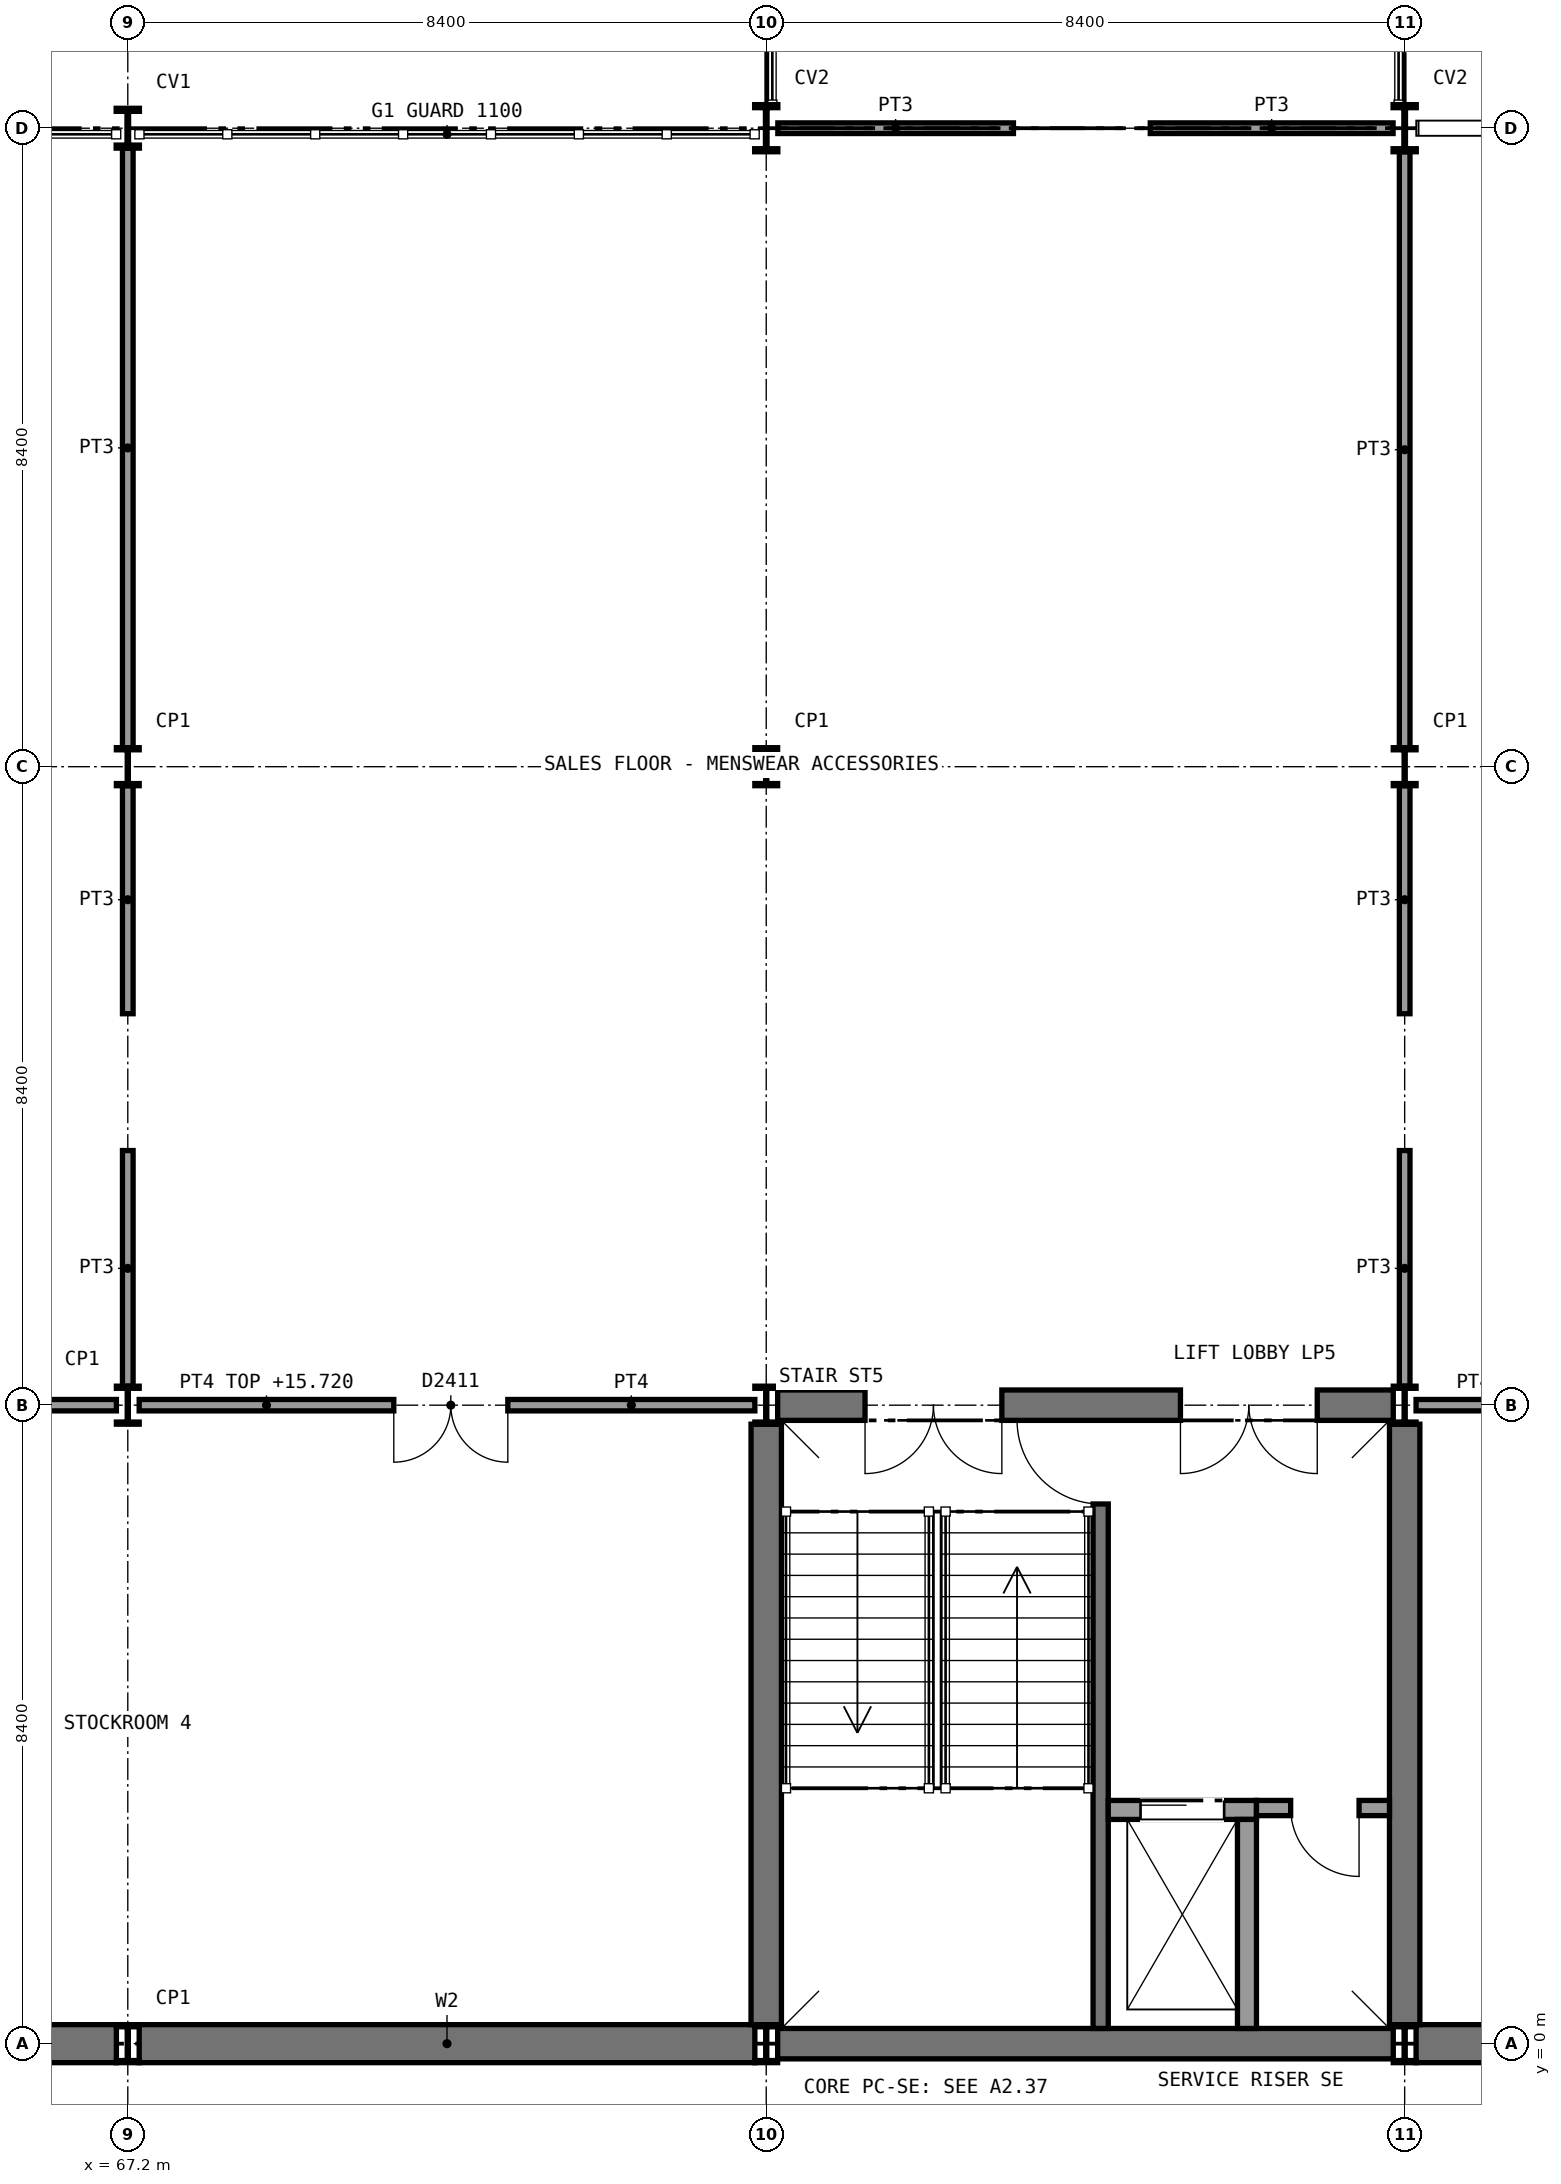
"""IFC4 building model, lengths in metres.
Left out: names, types, materials, properties, quantities, classifications, styles, units other than length and angle.
Written with IfcOpenShell. Run it as: python <this file> out.ifc"""

import sys

from ifc_helpers import new_model, si_unit, direction, frame, frame_2d, origin, origin_2d, place, context, subcontext, project, spatial, rectangle, i_section, extrude, element, fill, save


model = new_model("IFC4")
c1 = context("Model", 3, precision=1e-05, world=origin(), true_north=direction((0.0, 1.0)))
c2 = subcontext(c1, "Body", "Model", "MODEL_VIEW")
j1 = project(units=[si_unit("LENGTHUNIT", "METRE"), si_unit("PLANEANGLEUNIT", "RADIAN")], contexts=[c1])
p1 = place(None, origin())
s1 = spatial("IfcSite", under=j1, at=p1, CompositionType="ELEMENT")
p2 = place(p1, origin())
s2 = spatial("IfcBuilding", under=s1, at=p2, CompositionType="ELEMENT")
p3 = place(p2, frame((0.0, 0.0, 11.4)))
s3 = spatial("IfcBuildingStorey", under=s2, at=p3, CompositionType="ELEMENT", Elevation=11.4)
p4 = place(p3, frame((58.95, 0.0, 0.0), z_axis=(0.0, 0.0, 1.0), x_axis=(1.0, 0.0, 0.0)))
e1 = element("IfcWall", 1, at=p4, inside=s3, PredefinedType="SHEAR", context=c2, shape_type="SweptSolid", body=[
    extrude(rectangle(XDim=8.1, YDim=0.5, at=frame_2d((4.05, 0.0))), origin(), (0.0, 0.0, 1.0), 4.65),
])
p5 = place(p3, frame((67.35, 0.0, 0.0), z_axis=(0.0, 0.0, 1.0), x_axis=(1.0, 0.0, 0.0)))
e2 = element("IfcWall", 2, at=p5, inside=s3, PredefinedType="SHEAR", context=c2, shape_type="SweptSolid", body=[
    extrude(rectangle(XDim=8.1, YDim=0.5, at=frame_2d((4.05, 0.0))), origin(), (0.0, 0.0, 1.0), 4.65),
])
p6 = place(p3, frame((84.15, 0.0, 0.0), z_axis=(0.0, 0.0, 1.0), x_axis=(1.0, 0.0, 0.0)))
e3 = element("IfcWall", 3, at=p6, inside=s3, PredefinedType="SHEAR", context=c2, shape_type="SweptSolid", body=[
    extrude(rectangle(XDim=8.1, YDim=0.5, at=frame_2d((4.05, 0.0))), origin(), (0.0, 0.0, 1.0), 4.65),
])
p7 = place(p3, frame((75.75, 0.0, 0.0), z_axis=(0.0, 0.0, 1.0), x_axis=(1.0, 0.0, 0.0)))
e4 = element("IfcWall", 4, at=p7, inside=s3, PredefinedType="SHEAR", context=c2, shape_type="SweptSolid", body=[
    extrude(rectangle(XDim=8.1, YDim=0.4, at=frame_2d((4.05, 0.0))), origin(), (0.0, 0.0, 1.0), 4.65),
])
p8 = place(p3, frame((75.75, 8.4, 0.0), z_axis=(0.0, 0.0, 1.0), x_axis=(1.0, 0.0, 0.0)))
e5 = element("IfcWall", 5, at=p8, inside=s3, PredefinedType="SHEAR", context=c2, shape_type="SweptSolid", body=[
    extrude(rectangle(XDim=8.1, YDim=0.4, at=frame_2d((4.05, 0.0))), origin(), (0.0, 0.0, 1.0), 4.65),
])
p9 = place(p8, frame((1.15, 0.0, 0.0)))
e6 = element("IfcOpeningElement", 6, at=p9, cuts=e5, PredefinedType="OPENING", context=c2, shape_type="SweptSolid", body=[
    extrude(rectangle(XDim=1.8, YDim=2.1, at=frame_2d((0.9, 1.05))), frame((0.0, 0.21, 0.0), z_axis=(0.0, -1.0, 0.0), x_axis=(1.0, 0.0, 0.0)), (0.0, 0.0, 1.0), 0.42),
])
p10 = place(p8, frame((5.3, 0.0, 0.0)))
e7 = element("IfcOpeningElement", 7, at=p10, cuts=e5, PredefinedType="OPENING", context=c2, shape_type="SweptSolid", body=[
    extrude(rectangle(XDim=1.8, YDim=2.1, at=frame_2d((0.9, 1.05))), frame((0.0, 0.21, 0.0), z_axis=(0.0, -1.0, 0.0), x_axis=(1.0, 0.0, 0.0)), (0.0, 0.0, 1.0), 0.42),
])
for number, where, z_axis, x_axis in (
    (8, (75.6, 0.25, 0.0), (0.0, 0.0, 1.0), (0.0, 1.0, 0.0)),
    (9, (84.0, 0.25, 0.0), (0.0, 0.0, 1.0), (0.0, 1.0, 0.0)),
):
    element("IfcWall", number, at=place(p3, frame(where, z_axis=z_axis, x_axis=x_axis)), inside=s3, PredefinedType="SHEAR", context=c2, shape_type="SweptSolid", body=[
        extrude(rectangle(XDim=7.9, YDim=0.4, at=frame_2d((3.95, 0.0))), origin(), (0.0, 0.0, 1.0), 4.65),
    ])
for number, where, z_axis, x_axis in (
    (10, (67.2, 0.0, 0.0), (0.0, 0.0, 1.0), (1.0, 0.0, 0.0)),
    (11, (67.2, 8.4, 0.0), (0.0, 0.0, 1.0), (1.0, 0.0, 0.0)),
    (12, (67.2, 16.8, 0.0), (0.0, 0.0, 1.0), (1.0, 0.0, 0.0)),
):
    element("IfcColumn", number, at=place(p3, frame(where, z_axis=z_axis, x_axis=x_axis)), inside=s3, PredefinedType="COLUMN", context=c2, shape_type="SweptSolid", body=[
        extrude(i_section(OverallWidth=0.3, OverallDepth=0.5, WebThickness=0.014, FlangeThickness=0.028, FilletRadius=0.027, at=origin_2d()), origin(), (0.0, 0.0, 1.0), 4.8),
    ])
p11 = place(p3, frame((67.2, 25.2, 0.0), z_axis=(0.0, 0.0, 1.0), x_axis=(1.0, 0.0, 0.0)))
e13 = element("IfcColumn", 13, at=p11, inside=s3, PredefinedType="COLUMN", context=c2, shape_type="SweptSolid", body=[
    extrude(i_section(OverallWidth=0.306, OverallDepth=0.524, WebThickness=0.021, FlangeThickness=0.04, FilletRadius=0.027, at=origin_2d()), origin(), (0.0, 0.0, 1.0), 4.8),
])
for number, where, z_axis, x_axis in (
    (14, (75.6, 0.0, 0.0), (0.0, 0.0, 1.0), (1.0, 0.0, 0.0)),
    (15, (75.6, 8.4, 0.0), (0.0, 0.0, 1.0), (1.0, 0.0, 0.0)),
    (16, (75.6, 16.8, 0.0), (0.0, 0.0, 1.0), (1.0, 0.0, 0.0)),
):
    element("IfcColumn", number, at=place(p3, frame(where, z_axis=z_axis, x_axis=x_axis)), inside=s3, PredefinedType="COLUMN", context=c2, shape_type="SweptSolid", body=[
        extrude(i_section(OverallWidth=0.3, OverallDepth=0.5, WebThickness=0.014, FlangeThickness=0.028, FilletRadius=0.027, at=origin_2d()), origin(), (0.0, 0.0, 1.0), 4.8),
    ])
p12 = place(p3, frame((75.6, 25.2, 0.0), z_axis=(0.0, 0.0, 1.0), x_axis=(1.0, 0.0, 0.0)))
e17 = element("IfcColumn", 17, at=p12, inside=s3, PredefinedType="COLUMN", context=c2, shape_type="SweptSolid", body=[
    extrude(i_section(OverallWidth=0.305, OverallDepth=0.62, WebThickness=0.021, FlangeThickness=0.04, FilletRadius=0.027, at=origin_2d()), origin(), (0.0, 0.0, 1.0), 4.8),
])
for number, where, z_axis, x_axis in (
    (18, (84.0, 0.0, 0.0), (0.0, 0.0, 1.0), (1.0, 0.0, 0.0)),
    (19, (84.0, 8.4, 0.0), (0.0, 0.0, 1.0), (1.0, 0.0, 0.0)),
    (20, (84.0, 16.8, 0.0), (0.0, 0.0, 1.0), (1.0, 0.0, 0.0)),
):
    element("IfcColumn", number, at=place(p3, frame(where, z_axis=z_axis, x_axis=x_axis)), inside=s3, PredefinedType="COLUMN", context=c2, shape_type="SweptSolid", body=[
        extrude(i_section(OverallWidth=0.3, OverallDepth=0.5, WebThickness=0.014, FlangeThickness=0.028, FilletRadius=0.027, at=origin_2d()), origin(), (0.0, 0.0, 1.0), 4.8),
    ])
p13 = place(p3, frame((84.0, 25.2, 0.0), z_axis=(0.0, 0.0, 1.0), x_axis=(1.0, 0.0, 0.0)))
e21 = element("IfcColumn", 21, at=p13, inside=s3, PredefinedType="COLUMN", context=c2, shape_type="SweptSolid", body=[
    extrude(i_section(OverallWidth=0.305, OverallDepth=0.62, WebThickness=0.021, FlangeThickness=0.04, FilletRadius=0.027, at=origin_2d()), origin(), (0.0, 0.0, 1.0), 4.8),
])
p14 = place(p3, frame((58.95, 8.4, 0.0), z_axis=(0.0, 0.0, 1.0), x_axis=(1.0, 0.0, 0.0)))
e22 = element("IfcWall", 22, at=p14, inside=s3, PredefinedType="SOLIDWALL", context=c2, shape_type="SweptSolid", body=[
    extrude(rectangle(XDim=8.1, YDim=0.15, at=frame_2d((4.05, 0.0))), origin(), (0.0, 0.0, 1.0), 4.32),
])
p15 = place(p14, frame((3.35, 0.0, 0.0)))
e23 = element("IfcOpeningElement", 23, at=p15, cuts=e22, PredefinedType="OPENING", context=c2, shape_type="SweptSolid", body=[
    extrude(rectangle(XDim=1.5, YDim=2.1, at=frame_2d((0.75, 1.05))), frame((0.0, 0.085, 0.0), z_axis=(0.0, -1.0, 0.0), x_axis=(1.0, 0.0, 0.0)), (0.0, 0.0, 1.0), 0.17),
])
p16 = place(p3, frame((67.35, 8.4, 0.0), z_axis=(0.0, 0.0, 1.0), x_axis=(1.0, 0.0, 0.0)))
e24 = element("IfcWall", 24, at=p16, inside=s3, PredefinedType="SOLIDWALL", context=c2, shape_type="SweptSolid", body=[
    extrude(rectangle(XDim=8.1, YDim=0.15, at=frame_2d((4.05, 0.0))), origin(), (0.0, 0.0, 1.0), 4.32),
])
p17 = place(p16, frame((3.35, 0.0, 0.0)))
e25 = element("IfcOpeningElement", 25, at=p17, cuts=e24, PredefinedType="OPENING", context=c2, shape_type="SweptSolid", body=[
    extrude(rectangle(XDim=1.5, YDim=2.1, at=frame_2d((0.75, 1.05))), frame((0.0, 0.085, 0.0), z_axis=(0.0, -1.0, 0.0), x_axis=(1.0, 0.0, 0.0)), (0.0, 0.0, 1.0), 0.17),
])
p18 = place(p3, frame((84.15, 8.4, 0.0), z_axis=(0.0, 0.0, 1.0), x_axis=(1.0, 0.0, 0.0)))
e26 = element("IfcWall", 26, at=p18, inside=s3, PredefinedType="SOLIDWALL", context=c2, shape_type="SweptSolid", body=[
    extrude(rectangle(XDim=8.1, YDim=0.15, at=frame_2d((4.05, 0.0))), origin(), (0.0, 0.0, 1.0), 4.32),
])
p19 = place(p18, frame((3.35, 0.0, 0.0)))
e27 = element("IfcOpeningElement", 27, at=p19, cuts=e26, PredefinedType="OPENING", context=c2, shape_type="SweptSolid", body=[
    extrude(rectangle(XDim=1.5, YDim=2.1, at=frame_2d((0.75, 1.05))), frame((0.0, 0.085, 0.0), z_axis=(0.0, -1.0, 0.0), x_axis=(1.0, 0.0, 0.0)), (0.0, 0.0, 1.0), 0.17),
])
p20 = place(p3, frame((67.2, 8.65, 0.0), z_axis=(0.0, 0.0, 1.0), x_axis=(0.0, 1.0, 0.0)))
e28 = element("IfcWall", 28, at=p20, inside=s3, PredefinedType="PARTITIONING", context=c2, shape_type="SweptSolid", body=[
    extrude(rectangle(XDim=3.1, YDim=0.14, at=frame_2d((1.55, 0.0))), origin(), (0.0, 0.0, 1.0), 4.21),
])
p21 = place(p3, frame((67.2, 13.55, 0.0), z_axis=(0.0, 0.0, 1.0), x_axis=(0.0, 1.0, 0.0)))
e29 = element("IfcWall", 29, at=p21, inside=s3, PredefinedType="PARTITIONING", context=c2, shape_type="SweptSolid", body=[
    extrude(rectangle(XDim=3.0, YDim=0.14, at=frame_2d((1.5, 0.0))), origin(), (0.0, 0.0, 1.0), 4.21),
])
p22 = place(p3, frame((67.2, 17.05, 0.0), z_axis=(0.0, 0.0, 1.0), x_axis=(0.0, 1.0, 0.0)))
e30 = element("IfcWall", 30, at=p22, inside=s3, PredefinedType="PARTITIONING", context=c2, shape_type="SweptSolid", body=[
    extrude(rectangle(XDim=7.888, YDim=0.14, at=frame_2d((3.944, 0.0))), origin(), (0.0, 0.0, 1.0), 4.21),
])
p23 = place(p3, frame((84.0, 8.65, 0.0), z_axis=(0.0, 0.0, 1.0), x_axis=(0.0, 1.0, 0.0)))
e31 = element("IfcWall", 31, at=p23, inside=s3, PredefinedType="PARTITIONING", context=c2, shape_type="SweptSolid", body=[
    extrude(rectangle(XDim=3.1, YDim=0.14, at=frame_2d((1.55, 0.0))), origin(), (0.0, 0.0, 1.0), 4.21),
])
p24 = place(p3, frame((84.0, 13.55, 0.0), z_axis=(0.0, 0.0, 1.0), x_axis=(0.0, 1.0, 0.0)))
e32 = element("IfcWall", 32, at=p24, inside=s3, PredefinedType="PARTITIONING", context=c2, shape_type="SweptSolid", body=[
    extrude(rectangle(XDim=3.0, YDim=0.14, at=frame_2d((1.5, 0.0))), origin(), (0.0, 0.0, 1.0), 4.21),
])
p25 = place(p3, frame((84.0, 17.05, 0.0), z_axis=(0.0, 0.0, 1.0), x_axis=(0.0, 1.0, 0.0)))
e33 = element("IfcWall", 33, at=p25, inside=s3, PredefinedType="PARTITIONING", context=c2, shape_type="SweptSolid", body=[
    extrude(rectangle(XDim=7.84, YDim=0.14, at=frame_2d((3.92, 0.0))), origin(), (0.0, 0.0, 1.0), 4.21),
])
p26 = place(p3, frame((75.753, 25.2, 0.0), z_axis=(0.0, 0.0, 1.0), x_axis=(1.0, 0.0, 0.0)))
e34 = element("IfcWall", 34, at=p26, inside=s3, PredefinedType="PARTITIONING", context=c2, shape_type="SweptSolid", body=[
    extrude(rectangle(XDim=3.1, YDim=0.14, at=frame_2d((1.55, 0.0))), origin(), (0.0, 0.0, 1.0), 4.21),
])
p27 = place(p3, frame((80.653, 25.2, 0.0), z_axis=(0.0, 0.0, 1.0), x_axis=(1.0, 0.0, 0.0)))
e35 = element("IfcWall", 35, at=p27, inside=s3, PredefinedType="PARTITIONING", context=c2, shape_type="SweptSolid", body=[
    extrude(rectangle(XDim=3.195, YDim=0.14, at=frame_2d((1.597, 0.0))), origin(), (0.0, 0.0, 1.0), 4.21),
])
p28 = place(p3, frame((80.0, 0.2, 0.0), z_axis=(0.0, 0.0, 1.0), x_axis=(0.0, 1.0, 0.0)))
e36 = element("IfcWall", 36, at=p28, inside=s3, PredefinedType="SHEAR", context=c2, shape_type="SweptSolid", body=[
    extrude(rectangle(XDim=8.0, YDim=0.2, at=frame_2d((4.0, 0.0))), origin(), (0.0, 0.0, 1.0), 4.65),
])
p29 = place(p28, frame((6.9, 0.0, 0.0)))
e37 = element("IfcOpeningElement", 37, at=p29, cuts=e36, PredefinedType="OPENING", context=c2, shape_type="SweptSolid", body=[
    extrude(rectangle(XDim=1.11, YDim=2.1, at=frame_2d((0.555, 1.05))), frame((0.0, 0.11, 0.0), z_axis=(0.0, -1.0, 0.0), x_axis=(1.0, 0.0, 0.0)), (0.0, 0.0, 1.0), 0.22),
])
p30 = place(p3, frame((80.1, 3.075, 0.0), z_axis=(0.0, 0.0, 1.0), x_axis=(1.0, 0.0, 0.0)))
e38 = element("IfcWall", 38, at=p30, inside=s3, PredefinedType="SOLIDWALL", context=c2, shape_type="SweptSolid", body=[
    extrude(rectangle(XDim=1.95, YDim=0.25, at=frame_2d((0.975, 0.0))), origin(), (0.0, 0.0, 1.0), 4.8),
])
p31 = place(p30, frame((0.425, 0.0, 0.0)))
e39 = element("IfcOpeningElement", 39, at=p31, cuts=e38, PredefinedType="OPENING", context=c2, shape_type="SweptSolid", body=[
    extrude(rectangle(XDim=1.1, YDim=2.1, at=frame_2d((0.55, 1.05))), frame((0.0, 0.135, 0.0), z_axis=(0.0, -1.0, 0.0), x_axis=(1.0, 0.0, 0.0)), (0.0, 0.0, 1.0), 0.27),
])
p32 = place(p3, frame((81.925, 0.2, 0.0), z_axis=(0.0, 0.0, 1.0), x_axis=(0.0, 1.0, 0.0)))
e40 = element("IfcWall", 40, at=p32, inside=s3, PredefinedType="SOLIDWALL", context=c2, shape_type="SweptSolid", body=[
    extrude(rectangle(XDim=2.75, YDim=0.25, at=frame_2d((1.375, 0.0))), origin(), (0.0, 0.0, 1.0), 4.8),
])
p33 = place(p3, frame((82.05, 3.1, 0.0), z_axis=(0.0, 0.0, 1.0), x_axis=(1.0, 0.0, 0.0)))
e41 = element("IfcWall", 41, at=p33, inside=s3, PredefinedType="PARTITIONING", context=c2, shape_type="SweptSolid", body=[
    extrude(rectangle(XDim=1.75, YDim=0.2, at=frame_2d((0.875, 0.0))), origin(), (0.0, 0.0, 1.0), 4.65),
])
p34 = place(p33, frame((0.45, 0.0, 0.0)))
e42 = element("IfcOpeningElement", 42, at=p34, cuts=e41, PredefinedType="OPENING", context=c2, shape_type="SweptSolid", body=[
    extrude(rectangle(XDim=0.9, YDim=2.1, at=frame_2d((0.45, 1.05))), frame((0.0, 0.11, 0.0), z_axis=(0.0, -1.0, 0.0), x_axis=(1.0, 0.0, 0.0)), (0.0, 0.0, 1.0), 0.22),
])
p35 = place(p17, frame((1.5, 0.0, 0.0), z_axis=(0.0, 0.0, 1.0), x_axis=(-1.0, 0.0, 0.0)))
e43 = element("IfcDoor", 43, at=p35, inside=s3, OperationType="DOUBLE_DOOR_SINGLE_SWING", PredefinedType="DOOR", context=c2, shape_type="SweptSolid", body=[
    extrude(rectangle(XDim=1.5, YDim=2.1, at=frame_2d((0.75, 1.05))), frame((0.0, 0.025, 0.0), z_axis=(0.0, -1.0, 0.0), x_axis=(1.0, 0.0, 0.0)), (0.0, 0.0, 1.0), 0.05),
])
fill(e25, e43)
p36 = place(p29, origin())
e44 = element("IfcDoor", 44, at=p36, inside=s3, OperationType="SINGLE_SWING_RIGHT", PredefinedType="DOOR", context=c2, shape_type="SweptSolid", body=[
    extrude(rectangle(XDim=1.1, YDim=2.1, at=frame_2d((0.55, 1.05))), frame((0.0, 0.025, 0.0), z_axis=(0.0, -1.0, 0.0), x_axis=(1.0, 0.0, 0.0)), (0.0, 0.0, 1.0), 0.05),
])
fill(e37, e44)
p37 = place(p31, origin())
e45 = element("IfcDoor", 45, at=p37, inside=s3, OperationType="SLIDING_TO_LEFT", PredefinedType="DOOR", context=c2, shape_type="SweptSolid", body=[
    extrude(rectangle(XDim=1.1, YDim=2.1, at=frame_2d((0.55, 1.05))), frame((0.0, 0.025, 0.0), z_axis=(0.0, -1.0, 0.0), x_axis=(1.0, 0.0, 0.0)), (0.0, 0.0, 1.0), 0.05),
])
fill(e39, e45)
p38 = place(p34, frame((0.9, 0.0, 0.0), z_axis=(0.0, 0.0, 1.0), x_axis=(-1.0, 0.0, 0.0)))
e46 = element("IfcDoor", 46, at=p38, inside=s3, OperationType="SINGLE_SWING_LEFT", PredefinedType="DOOR", context=c2, shape_type="SweptSolid", body=[
    extrude(rectangle(XDim=0.9, YDim=2.1, at=frame_2d((0.45, 1.05))), frame((0.0, 0.025, 0.0), z_axis=(0.0, -1.0, 0.0), x_axis=(1.0, 0.0, 0.0)), (0.0, 0.0, 1.0), 0.05),
])
fill(e42, e46)
p39 = place(p9, frame((1.8, 0.0, 0.0), z_axis=(0.0, 0.0, 1.0), x_axis=(-1.0, 0.0, 0.0)))
e47 = element("IfcDoor", 47, at=p39, inside=s3, OperationType="DOUBLE_DOOR_SINGLE_SWING", PredefinedType="DOOR", context=c2, shape_type="SweptSolid", body=[
    extrude(rectangle(XDim=1.8, YDim=2.1, at=frame_2d((0.9, 1.05))), frame((0.0, 0.025, 0.0), z_axis=(0.0, -1.0, 0.0), x_axis=(1.0, 0.0, 0.0)), (0.0, 0.0, 1.0), 0.05),
])
fill(e6, e47)
p40 = place(p10, frame((1.8, 0.0, 0.0), z_axis=(0.0, 0.0, 1.0), x_axis=(-1.0, 0.0, 0.0)))
e48 = element("IfcDoor", 48, at=p40, inside=s3, OperationType="DOUBLE_DOOR_SINGLE_SWING", PredefinedType="DOOR", context=c2, shape_type="SweptSolid", body=[
    extrude(rectangle(XDim=1.8, YDim=2.1, at=frame_2d((0.9, 1.05))), frame((0.0, 0.025, 0.0), z_axis=(0.0, -1.0, 0.0), x_axis=(1.0, 0.0, 0.0)), (0.0, 0.0, 1.0), 0.05),
])
fill(e7, e48)
save(model, sys.argv[1])
